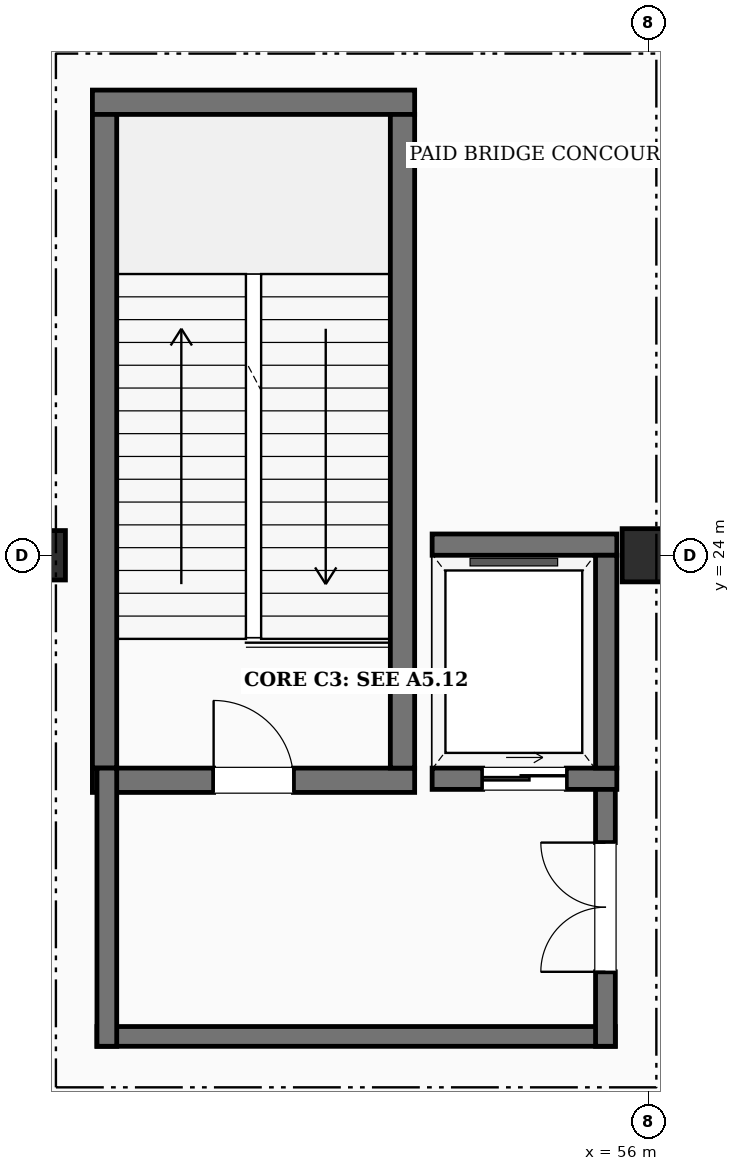
"""IFC4 building model, lengths in metres.
Left out: names, types, materials, properties, quantities, classifications, styles, units other than length and angle.
Written with IfcOpenShell. Run it as: python <this file> out.ifc"""

import sys

from ifc_helpers import new_model, si_unit, direction, frame, frame_2d, origin, origin_2d, place, context, subcontext, project, spatial, rectangle, extrude, element, fill, save


model = new_model("IFC4")
c1 = context("Model", 3, precision=1e-05, world=origin(), true_north=direction((0.0, 1.0)))
c2 = subcontext(c1, "Body", "Model", "MODEL_VIEW")
j1 = project(units=[si_unit("LENGTHUNIT", "METRE"), si_unit("PLANEANGLEUNIT", "RADIAN")], contexts=[c1])
p1 = place(None, origin())
s1 = spatial("IfcSite", under=j1, at=p1, CompositionType="ELEMENT")
p2 = place(p1, origin())
s2 = spatial("IfcBuilding", under=s1, at=p2, CompositionType="ELEMENT")
p3 = place(p2, frame((0.0, 0.0, 10.8)))
s3 = spatial("IfcBuildingStorey", under=s2, at=p3, CompositionType="ELEMENT", Elevation=10.8)
p4 = place(p3, frame((48.0, 24.0, 0.0), z_axis=(0.0, 0.0, 1.0), x_axis=(1.0, 0.0, 0.0)))
e1 = element("IfcColumn", 1, at=p4, inside=s3, PredefinedType="COLUMN", context=c2, shape_type="SweptSolid", body=[
    extrude(rectangle(XDim=0.65, YDim=0.65, at=origin_2d()), origin(), (0.0, 0.0, 1.0), 4.2),
])
p5 = place(p3, frame((56.0, 24.0, 0.0), z_axis=(0.0, 0.0, 1.0), x_axis=(1.0, 0.0, 0.0)))
e2 = element("IfcColumn", 2, at=p5, inside=s3, PredefinedType="COLUMN", context=c2, shape_type="SweptSolid", body=[
    extrude(rectangle(XDim=0.7, YDim=0.7, at=origin_2d()), origin(), (0.0, 0.0, 1.0), 4.2),
])
p6 = place(p3, frame((48.68, 21.04, 0.0), z_axis=(0.0, 0.0, 1.0), x_axis=(1.0, 0.0, 0.0)))
e3 = element("IfcWall", 3, at=p6, inside=s3, PredefinedType="SHEAR", context=c2, shape_type="SweptSolid", body=[
    extrude(rectangle(XDim=4.24, YDim=0.32, at=frame_2d((2.12, 0.0))), origin(), (0.0, 0.0, 1.0), 4.2),
])
p7 = place(p6, frame((1.595, 0.0, 0.0)))
e4 = element("IfcOpeningElement", 4, at=p7, cuts=e3, PredefinedType="OPENING", context=c2, shape_type="SweptSolid", body=[
    extrude(rectangle(XDim=1.05, YDim=2.15, at=frame_2d((0.525, 1.075))), frame((0.0, 0.17, 0.0), z_axis=(0.0, -1.0, 0.0), x_axis=(1.0, 0.0, 0.0)), (0.0, 0.0, 1.0), 0.34),
])
p8 = place(p3, frame((48.68, 29.96, 0.0), z_axis=(0.0, 0.0, 1.0), x_axis=(1.0, 0.0, 0.0)))
e5 = element("IfcWall", 5, at=p8, inside=s3, PredefinedType="SHEAR", context=c2, shape_type="SweptSolid", body=[
    extrude(rectangle(XDim=4.24, YDim=0.32, at=frame_2d((2.12, 0.0))), origin(), (0.0, 0.0, 1.0), 4.2),
])
for number, where, z_axis, x_axis in (
    (6, (48.84, 21.2, 0.0), (0.0, 0.0, 1.0), (0.0, 1.0, 0.0)),
    (7, (52.76, 21.2, 0.0), (0.0, 0.0, 1.0), (0.0, 1.0, 0.0)),
):
    element("IfcWall", number, at=place(p3, frame(where, z_axis=z_axis, x_axis=x_axis)), inside=s3, PredefinedType="SHEAR", context=c2, shape_type="SweptSolid", body=[
        extrude(rectangle(XDim=8.6, YDim=0.32, at=frame_2d((4.3, 0.0))), origin(), (0.0, 0.0, 1.0), 4.2),
    ])
p9 = place(p3, frame((55.56, 17.67, 0.0), z_axis=(0.0, 0.0, 1.0), x_axis=(-1.0, 0.0, 0.0)))
e8 = element("IfcWall", 8, at=p9, inside=s3, PredefinedType="SHEAR", context=c2, shape_type="SweptSolid", body=[
    extrude(rectangle(XDim=6.82, YDim=0.26, at=frame_2d((3.41, 0.0))), origin(), (0.0, 0.0, 1.0), 4.2),
])
p10 = place(p3, frame((48.87, 17.54, 0.0), z_axis=(0.0, 0.0, 1.0), x_axis=(0.0, 1.0, 0.0)))
e9 = element("IfcWall", 9, at=p10, inside=s3, PredefinedType="SHEAR", context=c2, shape_type="SweptSolid", body=[
    extrude(rectangle(XDim=3.66, YDim=0.26, at=frame_2d((1.83, 0.0))), origin(), (0.0, 0.0, 1.0), 4.2),
])
p11 = place(p3, frame((55.43, 17.54, 0.0), z_axis=(0.0, 0.0, 1.0), x_axis=(0.0, 1.0, 0.0)))
e10 = element("IfcWall", 10, at=p11, inside=s3, PredefinedType="SHEAR", context=c2, shape_type="SweptSolid", body=[
    extrude(rectangle(XDim=3.66, YDim=0.26, at=frame_2d((1.83, 0.0))), origin(), (0.0, 0.0, 1.0), 4.2),
])
p12 = place(p11, frame((0.98, 0.0, 0.0)))
e11 = element("IfcOpeningElement", 11, at=p12, cuts=e10, PredefinedType="OPENING", context=c2, shape_type="SweptSolid", body=[
    extrude(rectangle(XDim=1.7, YDim=2.2, at=frame_2d((0.85, 1.1))), frame((0.0, 0.14, 0.0), z_axis=(0.0, -1.0, 0.0), x_axis=(1.0, 0.0, 0.0)), (0.0, 0.0, 1.0), 0.28),
])
p13 = place(p3, frame((53.15, 21.06, 0.0), z_axis=(0.0, 0.0, 1.0), x_axis=(1.0, 0.0, 0.0)))
e12 = element("IfcWall", 12, at=p13, inside=s3, PredefinedType="SHEAR", context=c2, shape_type="SweptSolid", body=[
    extrude(rectangle(XDim=2.43, YDim=0.28, at=frame_2d((1.215, 0.0))), origin(), (0.0, 0.0, 1.0), 4.2),
])
p14 = place(p13, frame((0.665, 0.0, 0.0)))
e13 = element("IfcOpeningElement", 13, at=p14, cuts=e12, PredefinedType="OPENING", context=c2, shape_type="SweptSolid", body=[
    extrude(rectangle(XDim=1.1, YDim=2.15, at=frame_2d((0.55, 1.075))), frame((0.0, 0.15, 0.0), z_axis=(0.0, -1.0, 0.0), x_axis=(1.0, 0.0, 0.0)), (0.0, 0.0, 1.0), 0.3),
])
p15 = place(p3, frame((53.15, 24.14, 0.0), z_axis=(0.0, 0.0, 1.0), x_axis=(1.0, 0.0, 0.0)))
e14 = element("IfcWall", 14, at=p15, inside=s3, PredefinedType="SHEAR", context=c2, shape_type="SweptSolid", body=[
    extrude(rectangle(XDim=2.43, YDim=0.28, at=frame_2d((1.215, 0.0))), origin(), (0.0, 0.0, 1.0), 4.2),
])
p16 = place(p3, frame((55.44, 21.2, 0.0), z_axis=(0.0, 0.0, 1.0), x_axis=(0.0, 1.0, 0.0)))
e15 = element("IfcWall", 15, at=p16, inside=s3, PredefinedType="SHEAR", context=c2, shape_type="SweptSolid", body=[
    extrude(rectangle(XDim=2.8, YDim=0.28, at=frame_2d((1.4, 0.0))), origin(), (0.0, 0.0, 1.0), 4.2),
])
p17 = place(p7, origin())
e16 = element("IfcDoor", 16, at=p17, inside=s3, OperationType="SINGLE_SWING_LEFT", PredefinedType="DOOR", context=c2, shape_type="SweptSolid", body=[
    extrude(rectangle(XDim=1.05, YDim=2.15, at=frame_2d((0.525, 1.075))), frame((0.0, 0.025, 0.0), z_axis=(0.0, -1.0, 0.0), x_axis=(1.0, 0.0, 0.0)), (0.0, 0.0, 1.0), 0.05),
])
fill(e4, e16)
p18 = place(p12, origin())
e17 = element("IfcDoor", 17, at=p18, inside=s3, OperationType="DOUBLE_DOOR_SINGLE_SWING", PredefinedType="DOOR", context=c2, shape_type="SweptSolid", body=[
    extrude(rectangle(XDim=1.7, YDim=2.2, at=frame_2d((0.85, 1.1))), frame((0.0, 0.025, 0.0), z_axis=(0.0, -1.0, 0.0), x_axis=(1.0, 0.0, 0.0)), (0.0, 0.0, 1.0), 0.05),
])
fill(e11, e17)
p19 = place(p14, origin())
e18 = element("IfcDoor", 18, at=p19, inside=s3, OperationType="SLIDING_TO_LEFT", PredefinedType="DOOR", context=c2, shape_type="SweptSolid", body=[
    extrude(rectangle(XDim=1.1, YDim=2.15, at=frame_2d((0.55, 1.075))), frame((0.0, 0.025, 0.0), z_axis=(0.0, -1.0, 0.0), x_axis=(1.0, 0.0, 0.0)), (0.0, 0.0, 1.0), 0.05),
])
fill(e13, e18)
save(model, sys.argv[1])
